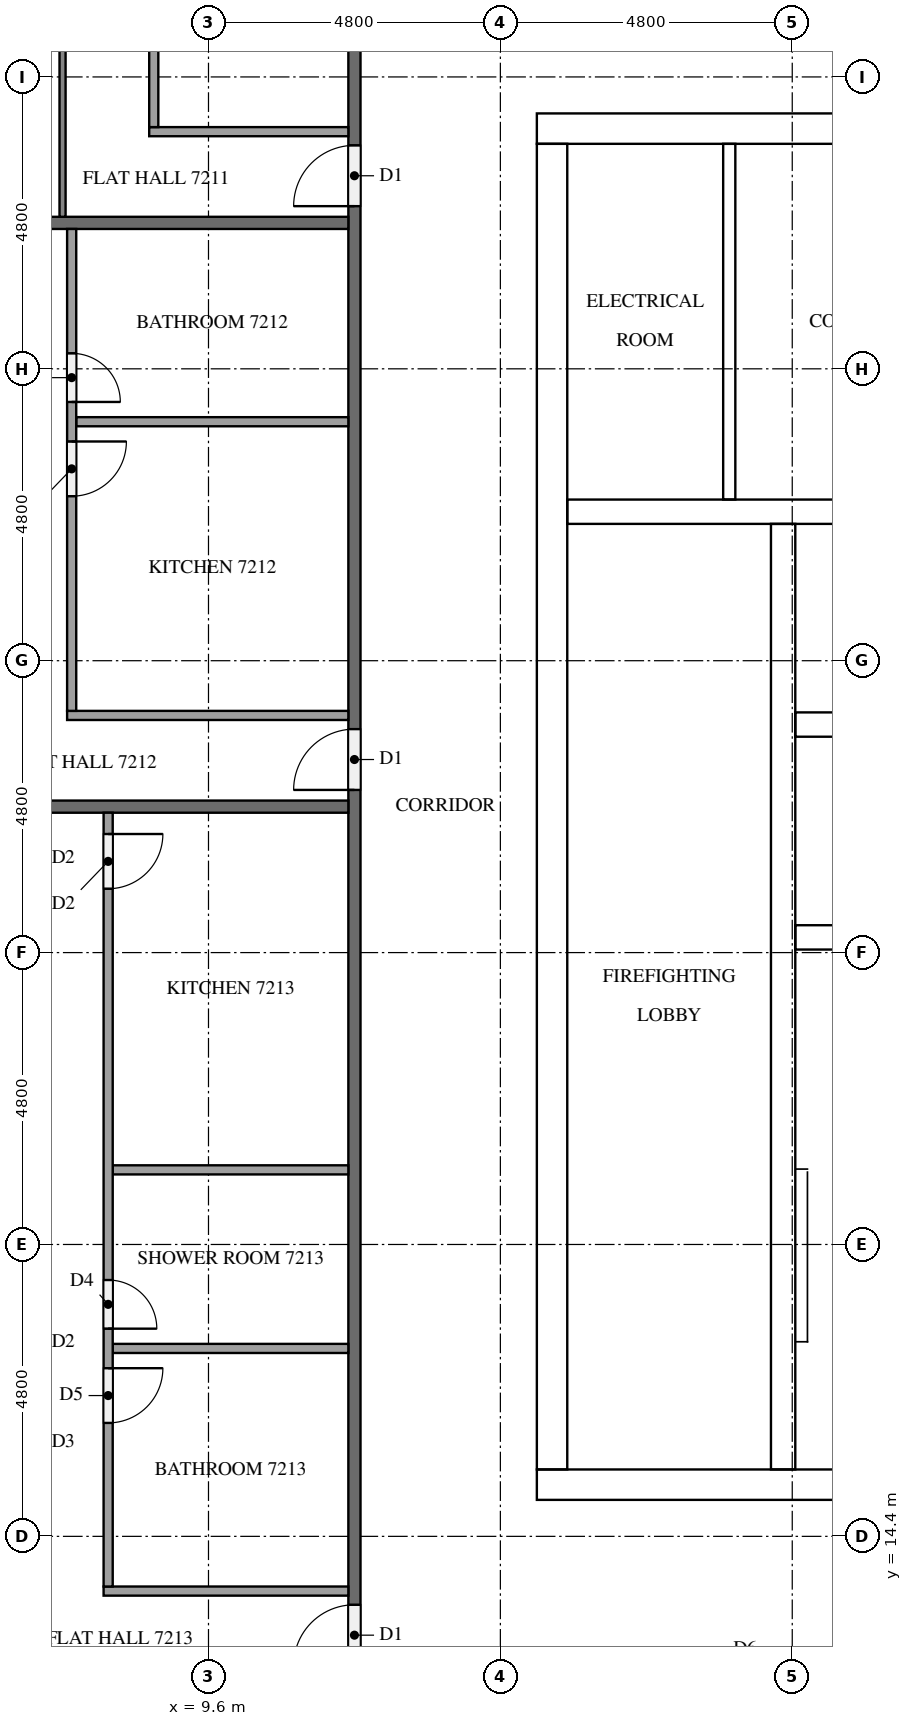
"""IFC4 building model, lengths in metres.
Left out: names, types, materials, properties, quantities, classifications, styles, units other than length and angle.
Written with IfcOpenShell. Run it as: python <this file> out.ifc"""

import sys

from ifc_helpers import new_model, si_unit, direction, frame, frame_2d, origin, place, context, subcontext, project, spatial, rectangle, extrude, element, fill, save


model = new_model("IFC4")
c1 = context("Model", 3, precision=1e-05, world=origin(), true_north=direction((0.0, 1.0)))
c2 = subcontext(c1, "Body", "Model", "MODEL_VIEW")
j1 = project(units=[si_unit("LENGTHUNIT", "METRE"), si_unit("PLANEANGLEUNIT", "RADIAN")], contexts=[c1])
p1 = place(None, origin())
s1 = spatial("IfcSite", under=j1, at=p1, CompositionType="ELEMENT")
p2 = place(p1, origin())
s2 = spatial("IfcBuilding", under=s1, at=p2, CompositionType="ELEMENT")
p3 = place(p2, frame((0.0, 0.0, 275.6)))
s3 = spatial("IfcBuildingStorey", under=s2, at=p3, CompositionType="ELEMENT", Elevation=275.6)
p4 = place(p3, frame((15.0, 15.25, 0.0), z_axis=(0.0, 0.0, 1.0), x_axis=(1.0, 0.0, 0.0)))
e1 = element("IfcWall", 1, at=p4, inside=s3, PredefinedType="SHEAR", context=c2, shape_type="SweptSolid", body=[
    extrude(rectangle(XDim=32.4, YDim=0.5, at=frame_2d((16.2, 0.0))), origin(), (0.0, 0.0, 1.0), 3.2),
])
p5 = place(p4, frame((15.3, 0.0, 0.0)))
e2 = element("IfcOpeningElement", 2, at=p5, cuts=e1, PredefinedType="OPENING", context=c2, shape_type="SweptSolid", body=[
    extrude(rectangle(XDim=1.8, YDim=2.1, at=frame_2d((0.9, 1.05))), frame((0.0, 0.26, 0.0), z_axis=(0.0, -1.0, 0.0), x_axis=(1.0, 0.0, 0.0)), (0.0, 0.0, 1.0), 0.52),
])
p6 = place(p3, frame((15.0, 37.55, 0.0), z_axis=(0.0, 0.0, 1.0), x_axis=(1.0, 0.0, 0.0)))
e3 = element("IfcWall", 3, at=p6, inside=s3, PredefinedType="SHEAR", context=c2, shape_type="SweptSolid", body=[
    extrude(rectangle(XDim=32.4, YDim=0.5, at=frame_2d((16.2, 0.0))), origin(), (0.0, 0.0, 1.0), 3.2),
])
p7 = place(p6, frame((15.3, 0.0, 0.0)))
e4 = element("IfcOpeningElement", 4, at=p7, cuts=e3, PredefinedType="OPENING", context=c2, shape_type="SweptSolid", body=[
    extrude(rectangle(XDim=1.8, YDim=2.1, at=frame_2d((0.9, 1.05))), frame((0.0, 0.26, 0.0), z_axis=(0.0, -1.0, 0.0), x_axis=(1.0, 0.0, 0.0)), (0.0, 0.0, 1.0), 0.52),
])
p8 = place(p6, frame((1.282, 0.0, 0.0)))
e5 = element("IfcOpeningElement", 5, at=p8, cuts=e3, PredefinedType="OPENING", context=c2, shape_type="SweptSolid", body=[
    extrude(rectangle(XDim=1.0, YDim=2.1, at=frame_2d((0.5, 1.05))), frame((0.0, 0.26, 0.0), z_axis=(0.0, -1.0, 0.0), x_axis=(1.0, 0.0, 0.0)), (0.0, 0.0, 1.0), 0.52),
])
p9 = place(p6, frame((5.082, 0.0, 0.0)))
e6 = element("IfcOpeningElement", 6, at=p9, cuts=e3, PredefinedType="OPENING", context=c2, shape_type="SweptSolid", body=[
    extrude(rectangle(XDim=1.0, YDim=2.1, at=frame_2d((0.5, 1.05))), frame((0.0, 0.26, 0.0), z_axis=(0.0, -1.0, 0.0), x_axis=(1.0, 0.0, 0.0)), (0.0, 0.0, 1.0), 0.52),
])
p10 = place(p3, frame((15.25, 15.5, 0.0), z_axis=(0.0, 0.0, 1.0), x_axis=(0.0, 1.0, 0.0)))
e7 = element("IfcWall", 7, at=p10, inside=s3, PredefinedType="SHEAR", context=c2, shape_type="SweptSolid", body=[
    extrude(rectangle(XDim=21.8, YDim=0.5, at=frame_2d((10.9, 0.0))), origin(), (0.0, 0.0, 1.0), 3.2),
])
p11 = place(p10, frame((5.26, 0.0, 0.0)))
e8 = element("IfcOpeningElement", 8, at=p11, cuts=e7, PredefinedType="OPENING", context=c2, shape_type="SweptSolid", body=[
    extrude(rectangle(XDim=1.2, YDim=2.1, at=frame_2d((0.6, 1.05))), frame((0.0, 0.26, 0.0), z_axis=(0.0, -1.0, 0.0), x_axis=(1.0, 0.0, 0.0)), (0.0, 0.0, 1.0), 0.52),
])
p12 = place(p3, frame((19.05, 15.5, 0.0), z_axis=(0.0, 0.0, 1.0), x_axis=(0.0, 1.0, 0.0)))
e9 = element("IfcWall", 9, at=p12, inside=s3, PredefinedType="SHEAR", context=c2, shape_type="SweptSolid", body=[
    extrude(rectangle(XDim=15.55, YDim=0.4, at=frame_2d((7.775, 0.0))), origin(), (0.0, 0.0, 1.0), 3.2),
])
p13 = place(p12, frame((9.95, 0.0, 0.0)))
e10 = element("IfcOpeningElement", 10, at=p13, cuts=e9, PredefinedType="OPENING", context=c2, shape_type="SweptSolid", body=[
    extrude(rectangle(XDim=1.1, YDim=2.1, at=frame_2d((0.55, 1.05))), frame((0.0, 0.21, 0.0), z_axis=(0.0, -1.0, 0.0), x_axis=(1.0, 0.0, 0.0)), (0.0, 0.0, 1.0), 0.42),
])
p14 = place(p12, frame((13.45, 0.0, 0.0)))
e11 = element("IfcOpeningElement", 11, at=p14, cuts=e9, PredefinedType="OPENING", context=c2, shape_type="SweptSolid", body=[
    extrude(rectangle(XDim=1.1, YDim=2.1, at=frame_2d((0.55, 1.05))), frame((0.0, 0.21, 0.0), z_axis=(0.0, -1.0, 0.0), x_axis=(1.0, 0.0, 0.0)), (0.0, 0.0, 1.0), 0.42),
])
p15 = place(p12, frame((0.7, 0.0, 0.0)))
e12 = element("IfcOpeningElement", 12, at=p15, cuts=e9, PredefinedType="OPENING", context=c2, shape_type="SweptSolid", body=[
    extrude(rectangle(XDim=1.2, YDim=2.1, at=frame_2d((0.6, 1.05))), frame((0.0, 0.21, 0.0), z_axis=(0.0, -1.0, 0.0), x_axis=(1.0, 0.0, 0.0)), (0.0, 0.0, 1.0), 0.42),
])
for number, where, z_axis, x_axis in (
    (13, (19.25, 24.25, 0.0), (0.0, 0.0, 1.0), (1.0, 0.0, 0.0)),
    (14, (19.25, 27.75, 0.0), (0.0, 0.0, 1.0), (1.0, 0.0, 0.0)),
):
    element("IfcWall", number, at=place(p3, frame(where, z_axis=z_axis, x_axis=x_axis)), inside=s3, PredefinedType="SHEAR", context=c2, shape_type="SweptSolid", body=[
        extrude(rectangle(XDim=3.65, YDim=0.4, at=frame_2d((1.825, 0.0))), origin(), (0.0, 0.0, 1.0), 3.2),
    ])
p16 = place(p3, frame((15.5, 31.25, 0.0), z_axis=(0.0, 0.0, 1.0), x_axis=(1.0, 0.0, 0.0)))
e15 = element("IfcWall", 15, at=p16, inside=s3, PredefinedType="SHEAR", context=c2, shape_type="SweptSolid", body=[
    extrude(rectangle(XDim=7.4, YDim=0.4, at=frame_2d((3.7, 0.0))), origin(), (0.0, 0.0, 1.0), 3.2),
])
p17 = place(p3, frame((18.164, 31.45, 0.0), z_axis=(0.0, 0.0, 1.0), x_axis=(0.0, 1.0, 0.0)))
e16 = element("IfcWall", 16, at=p17, inside=s3, PredefinedType="PARTITIONING", context=c2, shape_type="SweptSolid", body=[
    extrude(rectangle(XDim=5.85, YDim=0.2, at=frame_2d((2.925, 0.0))), origin(), (0.0, 0.0, 1.0), 3.2),
])
p18 = place(p3, frame((12.0, 12.1, 0.0), z_axis=(0.0, 0.0, 1.0), x_axis=(0.0, 1.0, 0.0)))
e17 = element("IfcWall", 17, at=p18, inside=s3, PredefinedType="PARTITIONING", context=c2, shape_type="SweptSolid", body=[
    extrude(rectangle(XDim=28.6, YDim=0.2, at=frame_2d((14.3, 0.0))), origin(), (0.0, 0.0, 1.0), 3.2),
])
p19 = place(p18, frame((24.175, 0.0, 0.0)))
e18 = element("IfcOpeningElement", 18, at=p19, cuts=e17, PredefinedType="OPENING", context=c2, shape_type="SweptSolid", body=[
    extrude(rectangle(XDim=1.0, YDim=2.1, at=frame_2d((0.5, 1.05))), frame((0.0, 0.11, 0.0), z_axis=(0.0, -1.0, 0.0), x_axis=(1.0, 0.0, 0.0)), (0.0, 0.0, 1.0), 0.22),
])
p20 = place(p18, frame((14.575, 0.0, 0.0)))
e19 = element("IfcOpeningElement", 19, at=p20, cuts=e17, PredefinedType="OPENING", context=c2, shape_type="SweptSolid", body=[
    extrude(rectangle(XDim=1.0, YDim=2.1, at=frame_2d((0.5, 1.05))), frame((0.0, 0.11, 0.0), z_axis=(0.0, -1.0, 0.0), x_axis=(1.0, 0.0, 0.0)), (0.0, 0.0, 1.0), 0.22),
])
p21 = place(p18, frame((0.175, 0.0, 0.0)))
e20 = element("IfcOpeningElement", 20, at=p21, cuts=e17, PredefinedType="OPENING", context=c2, shape_type="SweptSolid", body=[
    extrude(rectangle(XDim=1.0, YDim=2.1, at=frame_2d((0.5, 1.05))), frame((0.0, 0.11, 0.0), z_axis=(0.0, -1.0, 0.0), x_axis=(1.0, 0.0, 0.0)), (0.0, 0.0, 1.0), 0.22),
])
for number, where, z_axis, x_axis in (
    (21, (0.1, 36.0, 0.0), (0.0, 0.0, 1.0), (1.0, 0.0, 0.0)),
    (22, (0.1, 26.4, 0.0), (0.0, 0.0, 1.0), (1.0, 0.0, 0.0)),
):
    element("IfcWall", number, at=place(p3, frame(where, z_axis=z_axis, x_axis=x_axis)), inside=s3, PredefinedType="PARTITIONING", context=c2, shape_type="SweptSolid", body=[
        extrude(rectangle(XDim=11.8, YDim=0.2, at=frame_2d((5.9, 0.0))), origin(), (0.0, 0.0, 1.0), 3.2),
    ])
p22 = place(p3, frame((7.2, 36.1, 0.0), z_axis=(0.0, 0.0, 1.0), x_axis=(0.0, 1.0, 0.0)))
e23 = element("IfcWall", 23, at=p22, inside=s3, PredefinedType="PARTITIONING", context=c2, shape_type="SweptSolid", body=[
    extrude(rectangle(XDim=11.8, YDim=0.1, at=frame_2d((5.9, 0.0))), origin(), (0.0, 0.0, 1.0), 3.2),
])
p23 = place(p22, frame((5.75, 0.0, 0.0)))
e24 = element("IfcOpeningElement", 24, at=p23, cuts=e23, PredefinedType="OPENING", context=c2, shape_type="SweptSolid", body=[
    extrude(rectangle(XDim=1.0, YDim=2.1, at=frame_2d((0.5, 1.05))), frame((0.0, 0.06, 0.0), z_axis=(0.0, -1.0, 0.0), x_axis=(1.0, 0.0, 0.0)), (0.0, 0.0, 1.0), 0.12),
])
p24 = place(p22, frame((7.45, 0.0, 0.0)))
e25 = element("IfcOpeningElement", 25, at=p24, cuts=e23, PredefinedType="OPENING", context=c2, shape_type="SweptSolid", body=[
    extrude(rectangle(XDim=0.9, YDim=2.1, at=frame_2d((0.45, 1.05))), frame((0.0, 0.06, 0.0), z_axis=(0.0, -1.0, 0.0), x_axis=(1.0, 0.0, 0.0)), (0.0, 0.0, 1.0), 0.12),
])
p25 = place(p3, frame((11.9, 37.5, 0.0), z_axis=(0.0, 0.0, 1.0), x_axis=(-1.0, 0.0, 0.0)))
e26 = element("IfcWall", 26, at=p25, inside=s3, PredefinedType="PARTITIONING", context=c2, shape_type="SweptSolid", body=[
    extrude(rectangle(XDim=3.275, YDim=0.15, at=frame_2d((1.637, 0.0))), origin(), (0.0, 0.0, 1.0), 3.2),
])
p26 = place(p3, frame((8.7, 47.9, 0.0), z_axis=(0.0, 0.0, 1.0), x_axis=(0.0, -1.0, 0.0)))
e27 = element("IfcWall", 27, at=p26, inside=s3, PredefinedType="PARTITIONING", context=c2, shape_type="SweptSolid", body=[
    extrude(rectangle(XDim=10.325, YDim=0.15, at=frame_2d((5.163, 0.0))), origin(), (0.0, 0.0, 1.0), 3.2),
])
p27 = place(p26, frame((6.52, 0.0, 0.0)))
e28 = element("IfcOpeningElement", 28, at=p27, cuts=e27, PredefinedType="OPENING", context=c2, shape_type="SweptSolid", body=[
    extrude(rectangle(XDim=0.8, YDim=2.1, at=frame_2d((0.4, 1.05))), frame((0.0, 0.085, 0.0), z_axis=(0.0, -1.0, 0.0), x_axis=(1.0, 0.0, 0.0)), (0.0, 0.0, 1.0), 0.17),
])
p28 = place(p26, frame((4.97, 0.0, 0.0)))
e29 = element("IfcOpeningElement", 29, at=p28, cuts=e27, PredefinedType="OPENING", context=c2, shape_type="SweptSolid", body=[
    extrude(rectangle(XDim=0.9, YDim=2.1, at=frame_2d((0.45, 1.05))), frame((0.0, 0.085, 0.0), z_axis=(0.0, -1.0, 0.0), x_axis=(1.0, 0.0, 0.0)), (0.0, 0.0, 1.0), 0.17),
])
p29 = place(p3, frame((11.9, 32.73, 0.0), z_axis=(0.0, 0.0, 1.0), x_axis=(-1.0, 0.0, 0.0)))
e30 = element("IfcWall", 30, at=p29, inside=s3, PredefinedType="PARTITIONING", context=c2, shape_type="SweptSolid", body=[
    extrude(rectangle(XDim=4.475, YDim=0.15, at=frame_2d((2.237, 0.0))), origin(), (0.0, 0.0, 1.0), 3.2),
])
p30 = place(p3, frame((11.9, 27.9, 0.0), z_axis=(0.0, 0.0, 1.0), x_axis=(-1.0, 0.0, 0.0)))
e31 = element("IfcWall", 31, at=p30, inside=s3, PredefinedType="PARTITIONING", context=c2, shape_type="SweptSolid", body=[
    extrude(rectangle(XDim=4.625, YDim=0.15, at=frame_2d((2.312, 0.0))), origin(), (0.0, 0.0, 1.0), 3.2),
])
p31 = place(p3, frame((7.35, 35.9, 0.0), z_axis=(0.0, 0.0, 1.0), x_axis=(0.0, -1.0, 0.0)))
e32 = element("IfcWall", 32, at=p31, inside=s3, PredefinedType="PARTITIONING", context=c2, shape_type="SweptSolid", body=[
    extrude(rectangle(XDim=7.925, YDim=0.15, at=frame_2d((3.962, 0.0))), origin(), (0.0, 0.0, 1.0), 3.2),
])
p32 = place(p31, frame((3.495, 0.0, 0.0)))
e33 = element("IfcOpeningElement", 33, at=p32, cuts=e32, PredefinedType="OPENING", context=c2, shape_type="SweptSolid", body=[
    extrude(rectangle(XDim=0.9, YDim=2.1, at=frame_2d((0.45, 1.05))), frame((0.0, 0.085, 0.0), z_axis=(0.0, -1.0, 0.0), x_axis=(1.0, 0.0, 0.0)), (0.0, 0.0, 1.0), 0.17),
])
p33 = place(p31, frame((2.045, 0.0, 0.0)))
e34 = element("IfcOpeningElement", 34, at=p33, cuts=e32, PredefinedType="OPENING", context=c2, shape_type="SweptSolid", body=[
    extrude(rectangle(XDim=0.8, YDim=2.1, at=frame_2d((0.4, 1.05))), frame((0.0, 0.085, 0.0), z_axis=(0.0, -1.0, 0.0), x_axis=(1.0, 0.0, 0.0)), (0.0, 0.0, 1.0), 0.17),
])
for number, where, z_axis, x_axis in (
    (35, (11.9, 17.49, 0.0), (0.0, 0.0, 1.0), (-1.0, 0.0, 0.0)),
    (36, (11.9, 20.427, 0.0), (0.0, 0.0, 1.0), (-1.0, 0.0, 0.0)),
):
    element("IfcWall", number, at=place(p3, frame(where, z_axis=z_axis, x_axis=x_axis)), inside=s3, PredefinedType="PARTITIONING", context=c2, shape_type="SweptSolid", body=[
        extrude(rectangle(XDim=3.875, YDim=0.15, at=frame_2d((1.938, 0.0))), origin(), (0.0, 0.0, 1.0), 3.2),
    ])
p34 = place(p3, frame((11.9, 13.5, 0.0), z_axis=(0.0, 0.0, 1.0), x_axis=(-1.0, 0.0, 0.0)))
e37 = element("IfcWall", 37, at=p34, inside=s3, PredefinedType="PARTITIONING", context=c2, shape_type="SweptSolid", body=[
    extrude(rectangle(XDim=4.025, YDim=0.15, at=frame_2d((2.012, 0.0))), origin(), (0.0, 0.0, 1.0), 3.2),
])
p35 = place(p3, frame((7.95, 26.3, 0.0), z_axis=(0.0, 0.0, 1.0), x_axis=(0.0, -1.0, 0.0)))
e38 = element("IfcWall", 38, at=p35, inside=s3, PredefinedType="PARTITIONING", context=c2, shape_type="SweptSolid", body=[
    extrude(rectangle(XDim=12.725, YDim=0.15, at=frame_2d((6.363, 0.0))), origin(), (0.0, 0.0, 1.0), 3.2),
])
p36 = place(p35, frame((9.135, 0.0, 0.0)))
e39 = element("IfcOpeningElement", 39, at=p36, cuts=e38, PredefinedType="OPENING", context=c2, shape_type="SweptSolid", body=[
    extrude(rectangle(XDim=0.9, YDim=2.1, at=frame_2d((0.45, 1.05))), frame((0.0, 0.085, 0.0), z_axis=(0.0, -1.0, 0.0), x_axis=(1.0, 0.0, 0.0)), (0.0, 0.0, 1.0), 0.17),
])
p37 = place(p35, frame((7.685, 0.0, 0.0)))
e40 = element("IfcOpeningElement", 40, at=p37, cuts=e38, PredefinedType="OPENING", context=c2, shape_type="SweptSolid", body=[
    extrude(rectangle(XDim=0.8, YDim=2.1, at=frame_2d((0.4, 1.05))), frame((0.0, 0.085, 0.0), z_axis=(0.0, -1.0, 0.0), x_axis=(1.0, 0.0, 0.0)), (0.0, 0.0, 1.0), 0.17),
])
p38 = place(p35, frame((0.35, 0.0, 0.0)))
e41 = element("IfcOpeningElement", 41, at=p38, cuts=e38, PredefinedType="OPENING", context=c2, shape_type="SweptSolid", body=[
    extrude(rectangle(XDim=0.9, YDim=2.1, at=frame_2d((0.45, 1.05))), frame((0.0, 0.085, 0.0), z_axis=(0.0, -1.0, 0.0), x_axis=(1.0, 0.0, 0.0)), (0.0, 0.0, 1.0), 0.17),
])
p39 = place(p13, origin())
e42 = element("IfcDoor", 42, at=p39, inside=s3, OperationType="DOUBLE_DOOR_SLIDING", PredefinedType="DOOR", context=c2, shape_type="SweptSolid", body=[
    extrude(rectangle(XDim=1.1, YDim=2.1, at=frame_2d((0.55, 1.05))), frame((0.0, 0.025, 0.0), z_axis=(0.0, -1.0, 0.0), x_axis=(1.0, 0.0, 0.0)), (0.0, 0.0, 1.0), 0.05),
])
fill(e10, e42)
p40 = place(p14, origin())
e43 = element("IfcDoor", 43, at=p40, inside=s3, OperationType="DOUBLE_DOOR_SLIDING", PredefinedType="DOOR", context=c2, shape_type="SweptSolid", body=[
    extrude(rectangle(XDim=1.1, YDim=2.1, at=frame_2d((0.55, 1.05))), frame((0.0, 0.025, 0.0), z_axis=(0.0, -1.0, 0.0), x_axis=(1.0, 0.0, 0.0)), (0.0, 0.0, 1.0), 0.05),
])
fill(e11, e43)
p41 = place(p15, frame((1.2, 0.0, 0.0), z_axis=(0.0, 0.0, 1.0), x_axis=(-1.0, 0.0, 0.0)))
e44 = element("IfcDoor", 44, at=p41, inside=s3, OperationType="SINGLE_SWING_RIGHT", PredefinedType="DOOR", context=c2, shape_type="SweptSolid", body=[
    extrude(rectangle(XDim=1.2, YDim=2.1, at=frame_2d((0.6, 1.05))), frame((0.0, 0.025, 0.0), z_axis=(0.0, -1.0, 0.0), x_axis=(1.0, 0.0, 0.0)), (0.0, 0.0, 1.0), 0.05),
])
fill(e12, e44)
p42 = place(p11, frame((1.2, 0.0, 0.0), z_axis=(0.0, 0.0, 1.0), x_axis=(-1.0, 0.0, 0.0)))
e45 = element("IfcDoor", 45, at=p42, inside=s3, OperationType="SINGLE_SWING_LEFT", PredefinedType="DOOR", context=c2, shape_type="SweptSolid", body=[
    extrude(rectangle(XDim=1.2, YDim=2.1, at=frame_2d((0.6, 1.05))), frame((0.0, 0.025, 0.0), z_axis=(0.0, -1.0, 0.0), x_axis=(1.0, 0.0, 0.0)), (0.0, 0.0, 1.0), 0.05),
])
fill(e8, e45)
p43 = place(p8, origin())
e46 = element("IfcDoor", 46, at=p43, inside=s3, OperationType="SINGLE_SWING_LEFT", PredefinedType="DOOR", context=c2, shape_type="SweptSolid", body=[
    extrude(rectangle(XDim=1.0, YDim=2.1, at=frame_2d((0.5, 1.05))), frame((0.0, 0.025, 0.0), z_axis=(0.0, -1.0, 0.0), x_axis=(1.0, 0.0, 0.0)), (0.0, 0.0, 1.0), 0.05),
])
fill(e5, e46)
p44 = place(p19, origin())
e47 = element("IfcDoor", 47, at=p44, inside=s3, OperationType="SINGLE_SWING_LEFT", PredefinedType="DOOR", context=c2, shape_type="SweptSolid", body=[
    extrude(rectangle(XDim=1.0, YDim=2.1, at=frame_2d((0.5, 1.05))), frame((0.0, 0.025, 0.0), z_axis=(0.0, -1.0, 0.0), x_axis=(1.0, 0.0, 0.0)), (0.0, 0.0, 1.0), 0.05),
])
fill(e18, e47)
p45 = place(p20, origin())
e48 = element("IfcDoor", 48, at=p45, inside=s3, OperationType="SINGLE_SWING_LEFT", PredefinedType="DOOR", context=c2, shape_type="SweptSolid", body=[
    extrude(rectangle(XDim=1.0, YDim=2.1, at=frame_2d((0.5, 1.05))), frame((0.0, 0.025, 0.0), z_axis=(0.0, -1.0, 0.0), x_axis=(1.0, 0.0, 0.0)), (0.0, 0.0, 1.0), 0.05),
])
fill(e19, e48)
p46 = place(p21, origin())
e49 = element("IfcDoor", 49, at=p46, inside=s3, OperationType="SINGLE_SWING_LEFT", PredefinedType="DOOR", context=c2, shape_type="SweptSolid", body=[
    extrude(rectangle(XDim=1.0, YDim=2.1, at=frame_2d((0.5, 1.05))), frame((0.0, 0.025, 0.0), z_axis=(0.0, -1.0, 0.0), x_axis=(1.0, 0.0, 0.0)), (0.0, 0.0, 1.0), 0.05),
])
fill(e20, e49)
p47 = place(p32, origin())
e50 = element("IfcDoor", 50, at=p47, inside=s3, OperationType="SINGLE_SWING_LEFT", PredefinedType="DOOR", context=c2, shape_type="SweptSolid", body=[
    extrude(rectangle(XDim=0.9, YDim=2.1, at=frame_2d((0.45, 1.05))), frame((0.0, 0.025, 0.0), z_axis=(0.0, -1.0, 0.0), x_axis=(1.0, 0.0, 0.0)), (0.0, 0.0, 1.0), 0.05),
])
fill(e33, e50)
p48 = place(p33, origin())
e51 = element("IfcDoor", 51, at=p48, inside=s3, OperationType="SINGLE_SWING_RIGHT", PredefinedType="DOOR", context=c2, shape_type="SweptSolid", body=[
    extrude(rectangle(XDim=0.8, YDim=2.1, at=frame_2d((0.4, 1.05))), frame((0.0, 0.025, 0.0), z_axis=(0.0, -1.0, 0.0), x_axis=(1.0, 0.0, 0.0)), (0.0, 0.0, 1.0), 0.05),
])
fill(e34, e51)
p49 = place(p36, origin())
e52 = element("IfcDoor", 52, at=p49, inside=s3, OperationType="SINGLE_SWING_LEFT", PredefinedType="DOOR", context=c2, shape_type="SweptSolid", body=[
    extrude(rectangle(XDim=0.9, YDim=2.1, at=frame_2d((0.45, 1.05))), frame((0.0, 0.025, 0.0), z_axis=(0.0, -1.0, 0.0), x_axis=(1.0, 0.0, 0.0)), (0.0, 0.0, 1.0), 0.05),
])
fill(e39, e52)
p50 = place(p37, origin())
e53 = element("IfcDoor", 53, at=p50, inside=s3, OperationType="SINGLE_SWING_RIGHT", PredefinedType="DOOR", context=c2, shape_type="SweptSolid", body=[
    extrude(rectangle(XDim=0.8, YDim=2.1, at=frame_2d((0.4, 1.05))), frame((0.0, 0.025, 0.0), z_axis=(0.0, -1.0, 0.0), x_axis=(1.0, 0.0, 0.0)), (0.0, 0.0, 1.0), 0.05),
])
fill(e40, e53)
p51 = place(p38, origin())
e54 = element("IfcDoor", 54, at=p51, inside=s3, OperationType="SINGLE_SWING_LEFT", PredefinedType="DOOR", context=c2, shape_type="SweptSolid", body=[
    extrude(rectangle(XDim=0.9, YDim=2.1, at=frame_2d((0.45, 1.05))), frame((0.0, 0.025, 0.0), z_axis=(0.0, -1.0, 0.0), x_axis=(1.0, 0.0, 0.0)), (0.0, 0.0, 1.0), 0.05),
])
fill(e41, e54)
save(model, sys.argv[1])
